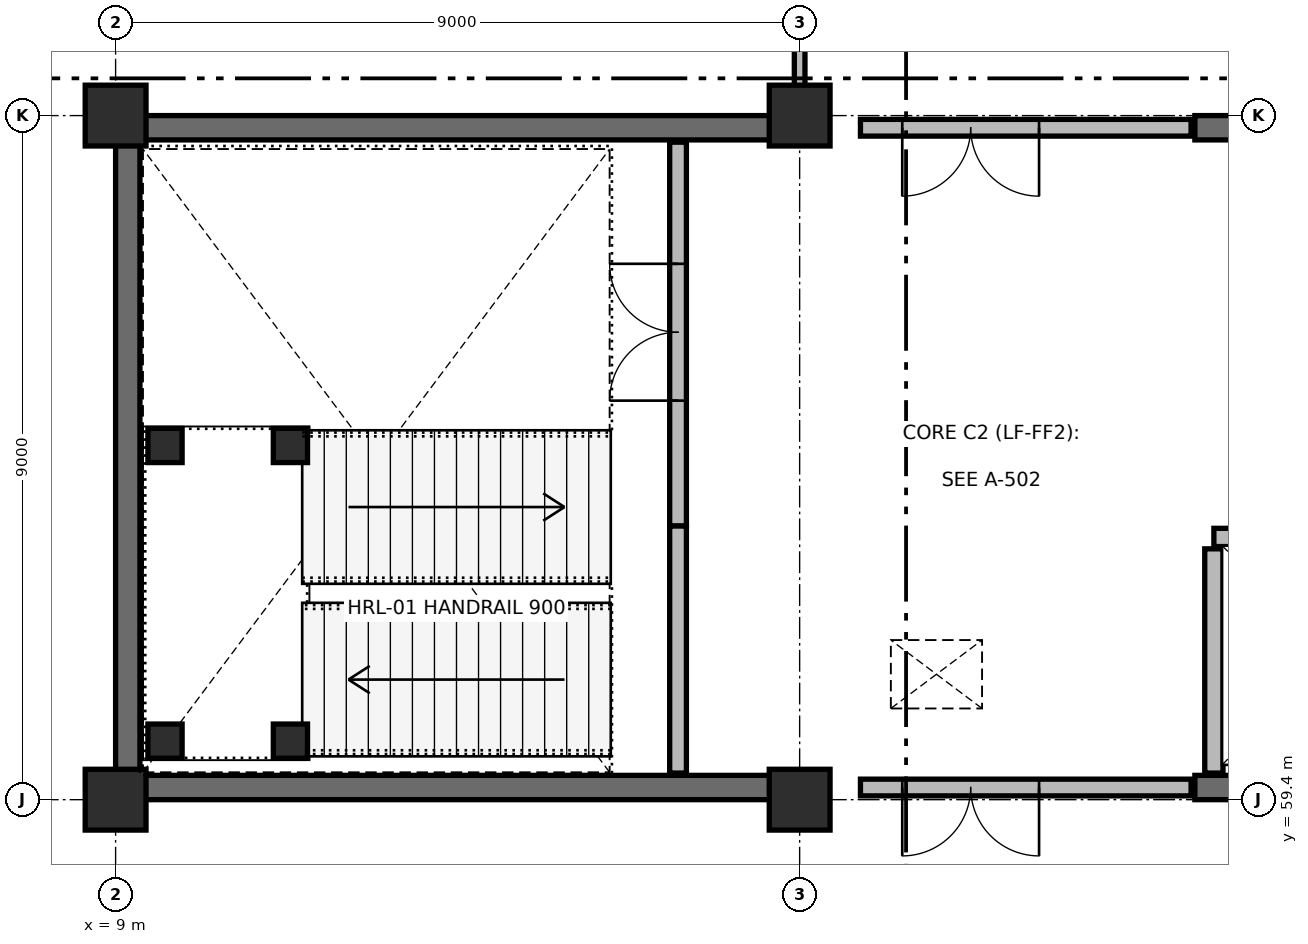
"""IFC4 building model, lengths in metres.
Left out: names, types, materials, properties, quantities, classifications, styles, units other than length and angle.
Written with IfcOpenShell. Run it as: python <this file> out.ifc"""

import sys

from ifc_helpers import new_model, si_unit, direction, frame, frame_2d, origin, origin_2d, place, context, subcontext, project, spatial, rectangle, extrude, element, fill, save


model = new_model("IFC4")
c1 = context("Model", 3, precision=1e-05, world=origin(), true_north=direction((0.0, 1.0)))
c2 = subcontext(c1, "Body", "Model", "MODEL_VIEW")
j1 = project(units=[si_unit("LENGTHUNIT", "METRE"), si_unit("PLANEANGLEUNIT", "RADIAN")], contexts=[c1])
p1 = place(None, origin())
s1 = spatial("IfcSite", under=j1, at=p1, CompositionType="ELEMENT")
p2 = place(p1, origin())
s2 = spatial("IfcBuilding", under=s1, at=p2, CompositionType="ELEMENT")
p3 = place(p2, origin())
s3 = spatial("IfcBuildingStorey", under=s2, at=p3, CompositionType="ELEMENT", Elevation=0.0)
for number, where, z_axis, x_axis in (
    (1, (9.0, 59.4, 0.0), (0.0, 0.0, 1.0), (1.0, 0.0, 0.0)),
    (2, (9.0, 68.4, 0.0), (0.0, 0.0, 1.0), (1.0, 0.0, 0.0)),
    (3, (18.0, 59.4, 0.0), (0.0, 0.0, 1.0), (1.0, 0.0, 0.0)),
    (4, (18.0, 68.4, 0.0), (0.0, 0.0, 1.0), (1.0, 0.0, 0.0)),
):
    element("IfcColumn", number, at=place(p3, frame(where, z_axis=z_axis, x_axis=x_axis)), inside=s3, PredefinedType="COLUMN", context=c2, shape_type="SweptSolid", body=[
        extrude(rectangle(XDim=0.8, YDim=0.8, at=origin_2d()), origin(), (0.0, 0.0, 1.0), 4.8),
    ])
p4 = place(p3, frame((9.0, 59.56, 0.0), z_axis=(0.0, 0.0, 1.0), x_axis=(1.0, 0.0, 0.0)))
e5 = element("IfcWall", 5, at=p4, inside=s3, PredefinedType="SHEAR", context=c2, shape_type="SweptSolid", body=[
    extrude(rectangle(XDim=9.2, YDim=0.32, at=frame_2d((4.6, 0.0))), origin(), (0.0, 0.0, 1.0), 4.8),
])
p5 = place(p3, frame((23.2, 59.56, 0.0), z_axis=(0.0, 0.0, 1.0), x_axis=(1.0, 0.0, 0.0)))
e6 = element("IfcWall", 6, at=p5, inside=s3, PredefinedType="SHEAR", context=c2, shape_type="SweptSolid", body=[
    extrude(rectangle(XDim=3.8, YDim=0.32, at=frame_2d((1.9, 0.0))), origin(), (0.0, 0.0, 1.0), 4.8),
])
p6 = place(p3, frame((9.0, 68.24, 0.0), z_axis=(0.0, 0.0, 1.0), x_axis=(1.0, 0.0, 0.0)))
e7 = element("IfcWall", 7, at=p6, inside=s3, PredefinedType="SHEAR", context=c2, shape_type="SweptSolid", body=[
    extrude(rectangle(XDim=9.2, YDim=0.32, at=frame_2d((4.6, 0.0))), origin(), (0.0, 0.0, 1.0), 4.8),
])
p7 = place(p3, frame((23.2, 68.24, 0.0), z_axis=(0.0, 0.0, 1.0), x_axis=(1.0, 0.0, 0.0)))
e8 = element("IfcWall", 8, at=p7, inside=s3, PredefinedType="SHEAR", context=c2, shape_type="SweptSolid", body=[
    extrude(rectangle(XDim=3.8, YDim=0.32, at=frame_2d((1.9, 0.0))), origin(), (0.0, 0.0, 1.0), 4.8),
])
p8 = place(p3, frame((9.16, 59.72, 0.0), z_axis=(0.0, 0.0, 1.0), x_axis=(0.0, 1.0, 0.0)))
e9 = element("IfcWall", 9, at=p8, inside=s3, PredefinedType="SHEAR", context=c2, shape_type="SweptSolid", body=[
    extrude(rectangle(XDim=8.36, YDim=0.32, at=frame_2d((4.18, 0.0))), origin(), (0.0, 0.0, 1.0), 4.8),
])
p9 = place(p3, frame((16.4, 68.05, 0.0), z_axis=(0.0, 0.0, 1.0), x_axis=(0.0, -1.0, 0.0)))
e10 = element("IfcWall", 10, at=p9, inside=s3, PredefinedType="PARTITIONING", context=c2, shape_type="SweptSolid", body=[
    extrude(rectangle(XDim=5.05, YDim=0.22, at=frame_2d((2.525, 0.0))), origin(), (0.0, 0.0, 1.0), 3.835),
])
p10 = place(p9, frame((1.6, 0.0, 0.0)))
e11 = element("IfcOpeningElement", 11, at=p10, cuts=e10, PredefinedType="OPENING", context=c2, shape_type="SweptSolid", body=[
    extrude(rectangle(XDim=1.8, YDim=2.2, at=frame_2d((0.9, 1.1))), frame((0.0, 0.12, 0.0), z_axis=(0.0, -1.0, 0.0), x_axis=(1.0, 0.0, 0.0)), (0.0, 0.0, 1.0), 0.24),
])
p11 = place(p3, frame((16.4, 59.75, 0.0), z_axis=(0.0, 0.0, 1.0), x_axis=(0.0, 1.0, 0.0)))
e12 = element("IfcWall", 12, at=p11, inside=s3, PredefinedType="PARTITIONING", context=c2, shape_type="SweptSolid", body=[
    extrude(rectangle(XDim=3.25, YDim=0.22, at=frame_2d((1.625, 0.0))), origin(), (0.0, 0.0, 1.0), 3.835),
])
p12 = place(p3, frame((23.45, 62.85, 0.0), z_axis=(0.0, 0.0, 1.0), x_axis=(1.0, 0.0, 0.0)))
e13 = element("IfcWall", 13, at=p12, inside=s3, PredefinedType="SOLIDWALL", context=c2, shape_type="SweptSolid", body=[
    extrude(rectangle(XDim=3.1, YDim=0.24, at=frame_2d((1.55, 0.0))), origin(), (0.0, 0.0, 1.0), 4.505),
])
p13 = place(p12, frame((0.95, 0.0, 0.0)))
e14 = element("IfcOpeningElement", 14, at=p13, cuts=e13, PredefinedType="OPENING", context=c2, shape_type="SweptSolid", body=[
    extrude(rectangle(XDim=1.2, YDim=2.2, at=frame_2d((0.6, 1.1))), frame((0.0, 0.13, 0.0), z_axis=(0.0, -1.0, 0.0), x_axis=(1.0, 0.0, 0.0)), (0.0, 0.0, 1.0), 0.26),
])
p14 = place(p3, frame((23.45, 59.75, 0.0), z_axis=(0.0, 0.0, 1.0), x_axis=(0.0, 1.0, 0.0)))
e15 = element("IfcWall", 15, at=p14, inside=s3, PredefinedType="SOLIDWALL", context=c2, shape_type="SweptSolid", body=[
    extrude(rectangle(XDim=2.95, YDim=0.24, at=frame_2d((1.475, 0.0))), origin(), (0.0, 0.0, 1.0), 3.835),
])
p15 = place(p3, frame((18.8, 59.56, 0.0), z_axis=(0.0, 0.0, 1.0), x_axis=(1.0, 0.0, 0.0)))
e16 = element("IfcWall", 16, at=p15, inside=s3, PredefinedType="PARTITIONING", context=c2, shape_type="SweptSolid", body=[
    extrude(rectangle(XDim=4.35, YDim=0.22, at=frame_2d((2.175, 0.0))), origin(), (0.0, 0.0, 1.0), 3.835),
])
p16 = place(p15, frame((0.55, 0.0, 0.0)))
e17 = element("IfcOpeningElement", 17, at=p16, cuts=e16, PredefinedType="OPENING", context=c2, shape_type="SweptSolid", body=[
    extrude(rectangle(XDim=1.8, YDim=2.2, at=frame_2d((0.9, 1.1))), frame((0.0, 0.12, 0.0), z_axis=(0.0, -1.0, 0.0), x_axis=(1.0, 0.0, 0.0)), (0.0, 0.0, 1.0), 0.24),
])
p17 = place(p3, frame((18.8, 68.24, 0.0), z_axis=(0.0, 0.0, 1.0), x_axis=(1.0, 0.0, 0.0)))
e18 = element("IfcWall", 18, at=p17, inside=s3, PredefinedType="PARTITIONING", context=c2, shape_type="SweptSolid", body=[
    extrude(rectangle(XDim=4.35, YDim=0.22, at=frame_2d((2.175, 0.0))), origin(), (0.0, 0.0, 1.0), 3.835),
])
p18 = place(p17, frame((0.55, 0.0, 0.0)))
e19 = element("IfcOpeningElement", 19, at=p18, cuts=e18, PredefinedType="OPENING", context=c2, shape_type="SweptSolid", body=[
    extrude(rectangle(XDim=1.8, YDim=2.2, at=frame_2d((0.9, 1.1))), frame((0.0, 0.12, 0.0), z_axis=(0.0, -1.0, 0.0), x_axis=(1.0, 0.0, 0.0)), (0.0, 0.0, 1.0), 0.24),
])
p19 = place(p3, frame((18.0, 68.4, 0.0), z_axis=(0.0, 0.0, 1.0), x_axis=(0.0, 1.0, 0.0)))
e20 = element("IfcWall", 20, at=p19, inside=s3, PredefinedType="PARTITIONING", context=c2, shape_type="SweptSolid", body=[
    extrude(rectangle(XDim=22.8, YDim=0.14, at=frame_2d((11.4, 0.0))), origin(), (0.0, 0.0, 1.0), 3.735),
])
p20 = place(p19, frame((4.541, 0.0, 0.0)))
e21 = element("IfcOpeningElement", 21, at=p20, cuts=e20, PredefinedType="OPENING", context=c2, shape_type="SweptSolid", body=[
    extrude(rectangle(XDim=0.95, YDim=2.1, at=frame_2d((0.475, 1.05))), frame((0.0, 0.08, 0.0), z_axis=(0.0, -1.0, 0.0), x_axis=(1.0, 0.0, 0.0)), (0.0, 0.0, 1.0), 0.16),
])
for number, where, z_axis, x_axis in (
    (22, (9.65, 60.17, 0.0), (0.0, 0.0, 1.0), (1.0, 0.0, 0.0)),
    (23, (11.3, 60.17, 0.0), (0.0, 0.0, 1.0), (1.0, 0.0, 0.0)),
    (24, (9.65, 64.06, 0.0), (0.0, 0.0, 1.0), (1.0, 0.0, 0.0)),
    (25, (11.3, 64.06, 0.0), (0.0, 0.0, 1.0), (1.0, 0.0, 0.0)),
):
    element("IfcColumn", number, at=place(p3, frame(where, z_axis=z_axis, x_axis=x_axis)), inside=s3, PredefinedType="COLUMN", context=c2, shape_type="SweptSolid", body=[
        extrude(rectangle(XDim=0.45, YDim=0.45, at=origin_2d()), origin(), (0.0, 0.0, 1.0), 4.8),
    ])
p21 = place(p10, origin())
e26 = element("IfcDoor", 26, at=p21, inside=s3, OperationType="DOUBLE_DOOR_SINGLE_SWING", PredefinedType="DOOR", context=c2, shape_type="SweptSolid", body=[
    extrude(rectangle(XDim=1.8, YDim=2.2, at=frame_2d((0.9, 1.1))), frame((0.0, 0.025, 0.0), z_axis=(0.0, -1.0, 0.0), x_axis=(1.0, 0.0, 0.0)), (0.0, 0.0, 1.0), 0.05),
])
fill(e11, e26)
p22 = place(p16, origin())
e27 = element("IfcDoor", 27, at=p22, inside=s3, OperationType="DOUBLE_DOOR_SINGLE_SWING", PredefinedType="DOOR", context=c2, shape_type="SweptSolid", body=[
    extrude(rectangle(XDim=1.8, YDim=2.2, at=frame_2d((0.9, 1.1))), frame((0.0, 0.025, 0.0), z_axis=(0.0, -1.0, 0.0), x_axis=(1.0, 0.0, 0.0)), (0.0, 0.0, 1.0), 0.05),
])
fill(e17, e27)
p23 = place(p18, origin())
e28 = element("IfcDoor", 28, at=p23, inside=s3, OperationType="DOUBLE_DOOR_SINGLE_SWING", PredefinedType="DOOR", context=c2, shape_type="SweptSolid", body=[
    extrude(rectangle(XDim=1.8, YDim=2.2, at=frame_2d((0.9, 1.1))), frame((0.0, 0.025, 0.0), z_axis=(0.0, -1.0, 0.0), x_axis=(1.0, 0.0, 0.0)), (0.0, 0.0, 1.0), 0.05),
])
fill(e19, e28)
save(model, sys.argv[1])
